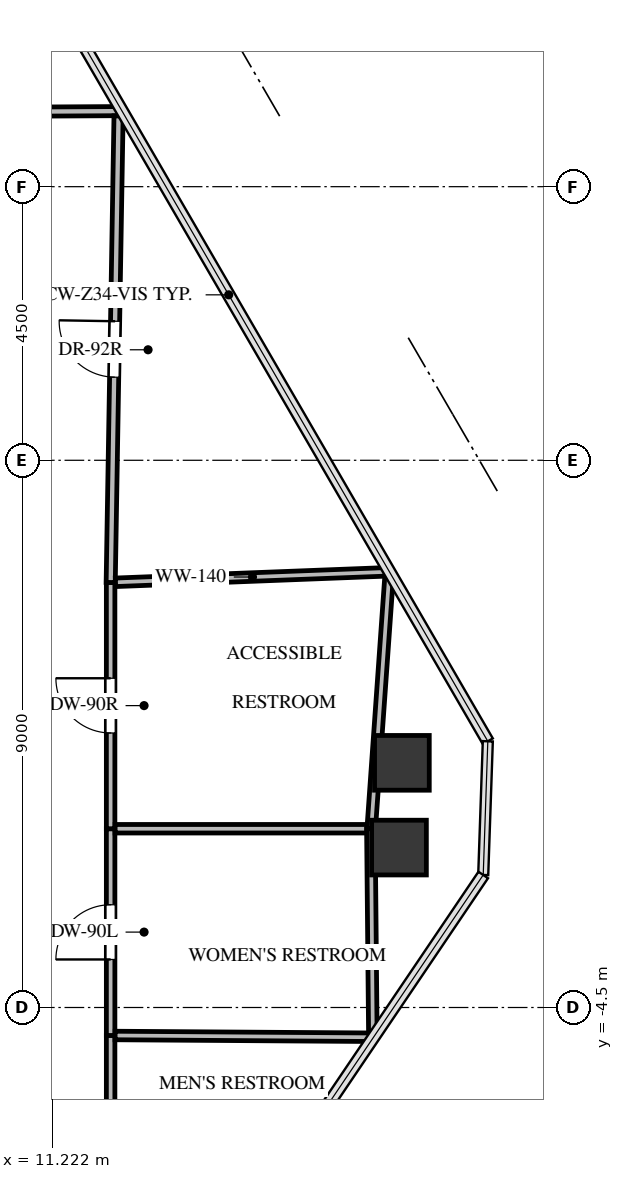
"""IFC4 building model, lengths in metres.
Left out: names, types, materials, properties, quantities, classifications, styles, units other than length and angle.
Written with IfcOpenShell. Run it as: python <this file> out.ifc"""

import sys

from ifc_helpers import new_model, si_unit, direction, frame, frame_2d, origin, origin_2d, place, context, subcontext, project, spatial, rectangle, extrude, source, transform, mapped, element, fill, save


model = new_model("IFC4")
c1 = context("Model", 3, precision=1e-05, world=origin(), true_north=direction((0.0, 1.0)))
c2 = subcontext(c1, "Body", "Model", "MODEL_VIEW")
j1 = project(units=[si_unit("LENGTHUNIT", "METRE"), si_unit("PLANEANGLEUNIT", "RADIAN")], contexts=[c1])
p1 = place(None, origin())
s1 = spatial("IfcSite", under=j1, at=p1, CompositionType="ELEMENT")
p2 = place(p1, origin())
s2 = spatial("IfcBuilding", under=s1, at=p2, CompositionType="ELEMENT")
p3 = place(p2, frame((0.0, 0.0, 221.6)))
s3 = spatial("IfcBuildingStorey", under=s2, at=p3, CompositionType="ELEMENT", Elevation=221.6)
m1 = source(origin(), c2, "Body", "SweptSolid", [
    extrude(rectangle(XDim=0.9, YDim=0.9, at=origin_2d()), origin(), (0.0, 0.0, 1.0), 3.3),
])
for number, where, z_axis, x_axis in (
    (1, (16.97, -0.476, -0.24), (0.0, 0.0, 1.0), (1.0, 0.0, 0.0)),
    (2, (16.922, -1.87, -0.24), (0.0, 0.0, 1.0), (1.0, 0.0, 0.0)),
):
    element("IfcColumn", number, at=place(p3, frame(where, z_axis=z_axis, x_axis=x_axis)), inside=s3, PredefinedType="COLUMN", context=c2, shape_type="MappedRepresentation", body=[
        mapped(m1, transform((0.0, 0.0, 0.0), x_axis=(1.0, 0.0, 0.0), y_axis=(0.0, 1.0, 0.0), z_axis=(0.0, 0.0, 1.0), scale=1.0)),
    ])
p4 = place(p3, frame((12.18, -8.44, 0.0), z_axis=(0.0, 0.0, 1.0), x_axis=(0.0, 1.0, 0.0)))
e3 = element("IfcWall", 3, at=p4, inside=s3, PredefinedType="PARTITIONING", context=c2, shape_type="SweptSolid", body=[
    extrude(rectangle(XDim=3.48, YDim=0.14, at=frame_2d((1.74, 0.0))), origin(), (0.0, 0.0, 1.0), 2.399),
])
p5 = place(p4, frame((1.29, 0.0, 0.0)))
e4 = element("IfcOpeningElement", 4, at=p5, cuts=e3, PredefinedType="OPENING", context=c2, shape_type="SweptSolid", body=[
    extrude(rectangle(XDim=0.9, YDim=2.05, at=frame_2d((0.45, 1.025))), frame((0.0, 0.08, 0.0), z_axis=(0.0, -1.0, 0.0), x_axis=(1.0, 0.0, 0.0)), (0.0, 0.0, 1.0), 0.16),
])
p6 = place(p3, frame((12.18, -4.96, 0.0), z_axis=(0.0, 0.0, 1.0), x_axis=(0.0, 1.0, 0.0)))
e5 = element("IfcWall", 5, at=p6, inside=s3, PredefinedType="PARTITIONING", context=c2, shape_type="SweptSolid", body=[
    extrude(rectangle(XDim=3.4, YDim=0.14, at=frame_2d((1.7, 0.0))), origin(), (0.0, 0.0, 1.0), 3.045),
])
p7 = place(p6, frame((1.25, 0.0, 0.0)))
e6 = element("IfcOpeningElement", 6, at=p7, cuts=e5, PredefinedType="OPENING", context=c2, shape_type="SweptSolid", body=[
    extrude(rectangle(XDim=0.9, YDim=2.05, at=frame_2d((0.45, 1.025))), frame((0.0, 0.08, 0.0), z_axis=(0.0, -1.0, 0.0), x_axis=(1.0, 0.0, 0.0)), (0.0, 0.0, 1.0), 0.16),
])
p8 = place(p3, frame((12.18, -1.56, 0.0), z_axis=(0.0, 0.0, 1.0), x_axis=(0.0, 1.0, 0.0)))
e7 = element("IfcWall", 7, at=p8, inside=s3, PredefinedType="PARTITIONING", context=c2, shape_type="SweptSolid", body=[
    extrude(rectangle(XDim=4.05, YDim=0.14, at=frame_2d((2.025, 0.0))), origin(), (0.0, 0.0, 1.0), 2.301),
])
p9 = place(p8, frame((1.575, 0.0, 0.0)))
e8 = element("IfcOpeningElement", 8, at=p9, cuts=e7, PredefinedType="OPENING", context=c2, shape_type="SweptSolid", body=[
    extrude(rectangle(XDim=0.9, YDim=2.05, at=frame_2d((0.45, 1.025))), frame((0.0, 0.08, 0.0), z_axis=(0.0, -1.0, 0.0), x_axis=(1.0, 0.0, 0.0)), (0.0, 0.0, 1.0), 0.16),
])
p10 = place(p3, frame((12.368, 10.243, 0.0), z_axis=(0.0, 0.0, 1.0), x_axis=(-0.999984623931, -0.005545439622, 0.0)))
e9 = element("IfcWall", 9, at=p10, inside=s3, PredefinedType="PARTITIONING", context=c2, shape_type="SweptSolid", body=[
    extrude(rectangle(XDim=11.359, YDim=0.15, at=frame_2d((5.679, 0.0))), origin(), (0.0, 0.0, 1.0), 2.301),
])
p11 = place(p10, frame((5.219, 0.0, 0.0)))
e10 = element("IfcOpeningElement", 10, at=p11, cuts=e9, PredefinedType="OPENING", context=c2, shape_type="SweptSolid", body=[
    extrude(rectangle(XDim=0.92, YDim=2.1, at=frame_2d((0.46, 1.05))), frame((0.0, 0.085, 0.0), z_axis=(0.0, -1.0, 0.0), x_axis=(1.0, 0.0, 0.0)), (0.0, 0.0, 1.0), 0.17),
])
p12 = place(p3, frame((12.181, 2.49, 0.0), z_axis=(0.0, 0.0, 1.0), x_axis=(0.016828134389, 0.999858396921, 0.0)))
e11 = element("IfcWall", 11, at=p12, inside=s3, PredefinedType="PARTITIONING", context=c2, shape_type="SweptSolid", body=[
    extrude(rectangle(XDim=7.675, YDim=0.15, at=frame_2d((3.837, 0.0))), origin(), (0.0, 0.0, 1.0), 2.399),
])
p13 = place(p12, frame((3.377, 0.0, 0.0)))
e12 = element("IfcOpeningElement", 12, at=p13, cuts=e11, PredefinedType="OPENING", context=c2, shape_type="SweptSolid", body=[
    extrude(rectangle(XDim=0.92, YDim=2.1, at=frame_2d((0.46, 1.05))), frame((0.0, 0.085, 0.0), z_axis=(0.0, -1.0, 0.0), x_axis=(1.0, 0.0, 0.0)), (0.0, 0.0, 1.0), 0.17),
])
p14 = place(p3, frame((12.254, -4.96, 0.0), z_axis=(0.0, 0.0, 1.0), x_axis=(0.999976630429, -0.006836563198, 0.0)))
e13 = element("IfcWall", 13, at=p14, inside=s3, PredefinedType="PARTITIONING", context=c2, shape_type="SweptSolid", body=[
    extrude(rectangle(XDim=4.25, YDim=0.14, at=frame_2d((2.125, 0.0))), origin(), (0.0, 0.0, 1.0), 2.399),
])
p15 = place(p3, frame((12.254, -1.56, 0.0), z_axis=(0.0, 0.0, 1.0), x_axis=(1.0, 0.0, 0.0)))
e14 = element("IfcWall", 14, at=p15, inside=s3, PredefinedType="PARTITIONING", context=c2, shape_type="SweptSolid", body=[
    extrude(rectangle(XDim=4.206, YDim=0.14, at=frame_2d((2.103, 0.0))), origin(), (0.0, 0.0, 1.0), 2.301),
])
p16 = place(p3, frame((16.46, -1.56, 0.0), z_axis=(0.0, 0.0, 1.0), x_axis=(0.009604446748, -0.999953876238, 0.0)))
e15 = element("IfcWall", 15, at=p16, inside=s3, PredefinedType="PARTITIONING", context=c2, shape_type="SweptSolid", body=[
    extrude(rectangle(XDim=3.355, YDim=0.14, at=frame_2d((1.678, 0.0))), origin(), (0.0, 0.0, 1.0), 2.301),
])
p17 = place(p3, frame((12.26, 2.493, 0.0), z_axis=(0.0, 0.0, 1.0), x_axis=(0.999256206289, 0.038562082324, 0.0)))
e16 = element("IfcWall", 16, at=p17, inside=s3, PredefinedType="PARTITIONING", context=c2, shape_type="SweptSolid", body=[
    extrude(rectangle(XDim=4.508, YDim=0.14, at=frame_2d((2.254, 0.0))), origin(), (0.0, 0.0, 1.0), 2.399),
])
p18 = place(p3, frame((16.76, 2.593, 0.0), z_axis=(0.0, 0.0, 1.0), x_axis=(-0.07055102187, -0.997508172053, 0.0)))
e17 = element("IfcWall", 17, at=p18, inside=s3, PredefinedType="PARTITIONING", context=c2, shape_type="SweptSolid", body=[
    extrude(rectangle(XDim=4.163, YDim=0.14, at=frame_2d((2.082, 0.0))), origin(), (0.0, 0.0, 1.0), 2.301),
])
m2 = source(origin(), c2, "Body", "SweptSolid", [
    extrude(rectangle(XDim=0.9, YDim=2.05, at=frame_2d((0.45, 1.025))), frame((0.0, 0.025, 0.0), z_axis=(0.0, -1.0, 0.0), x_axis=(1.0, 0.0, 0.0)), (0.0, 0.0, 1.0), 0.05),
])
p19 = place(p7, origin())
e18 = element("IfcDoor", 18, at=p19, inside=s3, OperationType="SINGLE_SWING_LEFT", PredefinedType="DOOR", context=c2, shape_type="MappedRepresentation", body=[
    mapped(m2, transform((0.0, 0.0, 0.0), x_axis=(1.0, 0.0, 0.0), y_axis=(0.0, 1.0, 0.0), z_axis=(0.0, 0.0, 1.0), scale=1.0)),
])
fill(e6, e18)
m3 = source(origin(), c2, "Body", "SweptSolid", [
    extrude(rectangle(XDim=0.9, YDim=2.05, at=frame_2d((0.45, 1.025))), frame((0.0, 0.025, 0.0), z_axis=(0.0, -1.0, 0.0), x_axis=(1.0, 0.0, 0.0)), (0.0, 0.0, 1.0), 0.05),
])
p20 = place(p9, origin())
e19 = element("IfcDoor", 19, at=p20, inside=s3, OperationType="SINGLE_SWING_RIGHT", PredefinedType="DOOR", context=c2, shape_type="MappedRepresentation", body=[
    mapped(m3, transform((0.0, 0.0, 0.0), x_axis=(1.0, 0.0, 0.0), y_axis=(0.0, 1.0, 0.0), z_axis=(0.0, 0.0, 1.0), scale=1.0)),
])
fill(e8, e19)
m4 = source(origin(), c2, "Body", "SweptSolid", [
    extrude(rectangle(XDim=0.92, YDim=2.1, at=frame_2d((0.46, 1.05))), frame((0.0, 0.025, 0.0), z_axis=(0.0, -1.0, 0.0), x_axis=(1.0, 0.0, 0.0)), (0.0, 0.0, 1.0), 0.05),
])
p21 = place(p13, origin())
e20 = element("IfcDoor", 20, at=p21, inside=s3, OperationType="SINGLE_SWING_RIGHT", PredefinedType="DOOR", context=c2, shape_type="MappedRepresentation", body=[
    mapped(m4, transform((0.0, 0.0, 0.0), x_axis=(1.0, 0.0, 0.0), y_axis=(0.0, 1.0, 0.0), z_axis=(0.0, 0.0, 1.0), scale=1.0)),
])
fill(e12, e20)
save(model, sys.argv[1])
